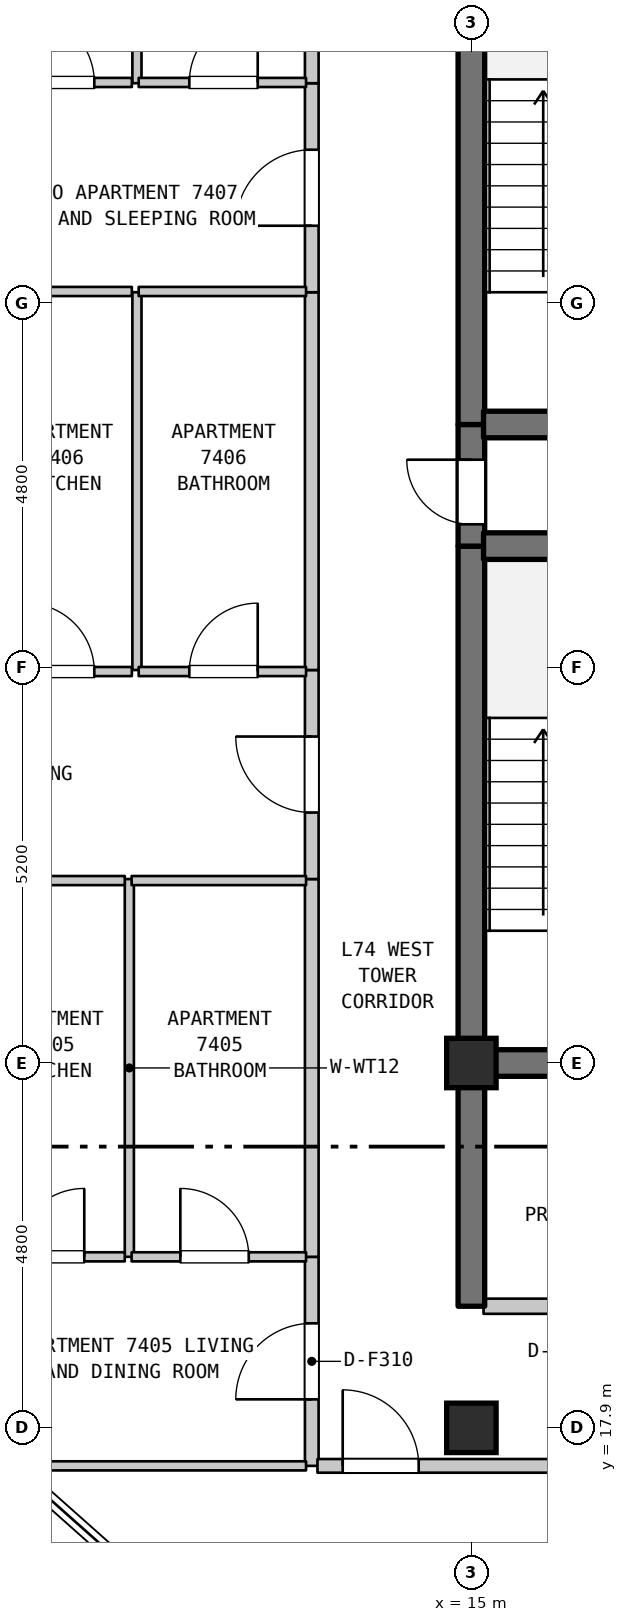
"""IFC4 building model, lengths in metres.
Left out: names, types, materials, properties, quantities, classifications, styles, units other than length and angle.
Written with IfcOpenShell. Run it as: python <this file> out.ifc"""

import sys

from ifc_helpers import new_model, si_unit, direction, frame, frame_2d, origin, origin_2d, place, context, subcontext, project, spatial, rectangle, extrude, element, fill, save


model = new_model("IFC4")
c1 = context("Model", 3, precision=1e-05, world=origin(), true_north=direction((0.0, 1.0)))
c2 = subcontext(c1, "Body", "Model", "MODEL_VIEW")
j1 = project(units=[si_unit("LENGTHUNIT", "METRE"), si_unit("PLANEANGLEUNIT", "RADIAN")], contexts=[c1])
p1 = place(None, origin())
s1 = spatial("IfcSite", under=j1, at=p1, CompositionType="ELEMENT")
p2 = place(p1, origin())
s2 = spatial("IfcBuilding", under=s1, at=p2, CompositionType="ELEMENT")
p3 = place(p2, frame((0.0, 0.0, 295.4)))
s3 = spatial("IfcBuildingStorey", under=s2, at=p3, CompositionType="ELEMENT", Elevation=295.4)
for number, where, z_axis, x_axis in (
    (1, (15.0, 17.9, 0.0), (0.0, 0.0, 1.0), (1.0, 0.0, 0.0)),
    (2, (15.0, 22.7, 0.0), (0.0, 0.0, 1.0), (1.0, 0.0, 0.0)),
):
    element("IfcColumn", number, at=place(p3, frame(where, z_axis=z_axis, x_axis=x_axis)), inside=s3, PredefinedType="COLUMN", context=c2, shape_type="SweptSolid", body=[
        extrude(rectangle(XDim=0.65, YDim=0.65, at=origin_2d()), origin(), (0.0, 0.0, 1.0), 3.7),
    ])
p4 = place(p3, frame((10.5, 20.15, 0.0), z_axis=(0.0, 0.0, 1.0), x_axis=(0.0, 1.0, 0.0)))
e3 = element("IfcWall", 3, at=p4, inside=s3, PredefinedType="PARTITIONING", context=c2, shape_type="SweptSolid", body=[
    extrude(rectangle(XDim=4.97, YDim=0.12, at=frame_2d((2.485, 0.0))), origin(), (0.0, 0.0, 1.0), 3.38),
])
p5 = place(p3, frame((10.6, 27.87, 0.0), z_axis=(0.0, 0.0, 1.0), x_axis=(0.0, 1.0, 0.0)))
e4 = element("IfcWall", 4, at=p5, inside=s3, PredefinedType="PARTITIONING", context=c2, shape_type="SweptSolid", body=[
    extrude(rectangle(XDim=4.97, YDim=0.12, at=frame_2d((2.485, 0.0))), origin(), (0.0, 0.0, 1.0), 3.38),
])
p6 = place(p3, frame((10.6, 35.59, 0.0), z_axis=(0.0, 0.0, 1.0), x_axis=(0.0, 1.0, 0.0)))
e5 = element("IfcWall", 5, at=p6, inside=s3, PredefinedType="PARTITIONING", context=c2, shape_type="SweptSolid", body=[
    extrude(rectangle(XDim=4.51, YDim=0.12, at=frame_2d((2.255, 0.0))), origin(), (0.0, 0.0, 1.0), 3.38),
])
p7 = place(p3, frame((12.9, 17.4, 0.0), z_axis=(0.0, 0.0, 1.0), x_axis=(0.0, 1.0, 0.0)))
e6 = element("IfcWall", 6, at=p7, inside=s3, PredefinedType="STANDARD", context=c2, shape_type="SweptSolid", body=[
    extrude(rectangle(XDim=2.75, YDim=0.18, at=frame_2d((1.375, 0.0))), origin(), (0.0, 0.0, 1.0), 3.38),
])
p8 = place(p7, frame((0.875, 0.0, 0.0)))
e7 = element("IfcOpeningElement", 7, at=p8, cuts=e6, PredefinedType="OPENING", context=c2, shape_type="SweptSolid", body=[
    extrude(rectangle(XDim=1.0, YDim=2.15, at=frame_2d((0.5, 1.075))), frame((0.0, 0.1, 0.0), z_axis=(0.0, -1.0, 0.0), x_axis=(1.0, 0.0, 0.0)), (0.0, 0.0, 1.0), 0.2),
])
p9 = place(p3, frame((12.9, 20.15, 0.0), z_axis=(0.0, 0.0, 1.0), x_axis=(0.0, 1.0, 0.0)))
e8 = element("IfcWall", 8, at=p9, inside=s3, PredefinedType="STANDARD", context=c2, shape_type="SweptSolid", body=[
    extrude(rectangle(XDim=4.97, YDim=0.18, at=frame_2d((2.485, 0.0))), origin(), (0.0, 0.0, 1.0), 3.38),
])
p10 = place(p3, frame((12.9, 25.12, 0.0), z_axis=(0.0, 0.0, 1.0), x_axis=(0.0, 1.0, 0.0)))
e9 = element("IfcWall", 9, at=p10, inside=s3, PredefinedType="STANDARD", context=c2, shape_type="SweptSolid", body=[
    extrude(rectangle(XDim=2.75, YDim=0.18, at=frame_2d((1.375, 0.0))), origin(), (0.0, 0.0, 1.0), 3.38),
])
p11 = place(p10, frame((0.875, 0.0, 0.0)))
e10 = element("IfcOpeningElement", 10, at=p11, cuts=e9, PredefinedType="OPENING", context=c2, shape_type="SweptSolid", body=[
    extrude(rectangle(XDim=1.0, YDim=2.15, at=frame_2d((0.5, 1.075))), frame((0.0, 0.1, 0.0), z_axis=(0.0, -1.0, 0.0), x_axis=(1.0, 0.0, 0.0)), (0.0, 0.0, 1.0), 0.2),
])
p12 = place(p3, frame((12.9, 27.87, 0.0), z_axis=(0.0, 0.0, 1.0), x_axis=(0.0, 1.0, 0.0)))
e11 = element("IfcWall", 11, at=p12, inside=s3, PredefinedType="STANDARD", context=c2, shape_type="SweptSolid", body=[
    extrude(rectangle(XDim=4.97, YDim=0.18, at=frame_2d((2.485, 0.0))), origin(), (0.0, 0.0, 1.0), 3.38),
])
p13 = place(p3, frame((12.9, 32.84, 0.0), z_axis=(0.0, 0.0, 1.0), x_axis=(0.0, 1.0, 0.0)))
e12 = element("IfcWall", 12, at=p13, inside=s3, PredefinedType="STANDARD", context=c2, shape_type="SweptSolid", body=[
    extrude(rectangle(XDim=2.75, YDim=0.18, at=frame_2d((1.375, 0.0))), origin(), (0.0, 0.0, 1.0), 3.38),
])
p14 = place(p13, frame((0.875, 0.0, 0.0)))
e13 = element("IfcOpeningElement", 13, at=p14, cuts=e12, PredefinedType="OPENING", context=c2, shape_type="SweptSolid", body=[
    extrude(rectangle(XDim=1.0, YDim=2.15, at=frame_2d((0.5, 1.075))), frame((0.0, 0.1, 0.0), z_axis=(0.0, -1.0, 0.0), x_axis=(1.0, 0.0, 0.0)), (0.0, 0.0, 1.0), 0.2),
])
p15 = place(p3, frame((12.9, 35.59, 0.0), z_axis=(0.0, 0.0, 1.0), x_axis=(0.0, 1.0, 0.0)))
e14 = element("IfcWall", 14, at=p15, inside=s3, PredefinedType="STANDARD", context=c2, shape_type="SweptSolid", body=[
    extrude(rectangle(XDim=4.51, YDim=0.18, at=frame_2d((2.255, 0.0))), origin(), (0.0, 0.0, 1.0), 3.38),
])
p16 = place(p3, frame((15.0, 19.5, 0.0), z_axis=(0.0, 0.0, 1.0), x_axis=(0.0, 1.0, 0.0)))
e15 = element("IfcWall", 15, at=p16, inside=s3, PredefinedType="SHEAR", context=c2, shape_type="SweptSolid", body=[
    extrude(rectangle(XDim=3.2, YDim=0.35, at=frame_2d((1.6, 0.0))), origin(), (0.0, 0.0, 1.0), 3.38),
])
p17 = place(p3, frame((15.0, 22.7, 0.0), z_axis=(0.0, 0.0, 1.0), x_axis=(0.0, 1.0, 0.0)))
e16 = element("IfcWall", 16, at=p17, inside=s3, PredefinedType="SHEAR", context=c2, shape_type="SweptSolid", body=[
    extrude(rectangle(XDim=6.8, YDim=0.35, at=frame_2d((3.4, 0.0))), origin(), (0.0, 0.0, 1.0), 3.38),
])
p18 = place(p3, frame((15.0, 29.5, 0.0), z_axis=(0.0, 0.0, 1.0), x_axis=(0.0, 1.0, 0.0)))
e17 = element("IfcWall", 17, at=p18, inside=s3, PredefinedType="SHEAR", context=c2, shape_type="SweptSolid", body=[
    extrude(rectangle(XDim=1.6, YDim=0.35, at=frame_2d((0.8, 0.0))), origin(), (0.0, 0.0, 1.0), 3.38),
])
p19 = place(p18, frame((0.287, 0.0, 0.0)))
e18 = element("IfcOpeningElement", 18, at=p19, cuts=e17, PredefinedType="OPENING", context=c2, shape_type="SweptSolid", body=[
    extrude(rectangle(XDim=0.85, YDim=2.1, at=frame_2d((0.425, 1.05))), frame((0.0, 0.185, 0.0), z_axis=(0.0, -1.0, 0.0), x_axis=(1.0, 0.0, 0.0)), (0.0, 0.0, 1.0), 0.37),
])
p20 = place(p3, frame((15.0, 31.1, 0.0), z_axis=(0.0, 0.0, 1.0), x_axis=(0.0, 1.0, 0.0)))
e19 = element("IfcWall", 19, at=p20, inside=s3, PredefinedType="SHEAR", context=c2, shape_type="SweptSolid", body=[
    extrude(rectangle(XDim=6.8, YDim=0.35, at=frame_2d((3.4, 0.0))), origin(), (0.0, 0.0, 1.0), 3.38),
])
p21 = place(p3, frame((8.973, 17.4, 0.0), z_axis=(0.0, 0.0, 1.0), x_axis=(1.0, 0.0, 0.0)))
e20 = element("IfcWall", 20, at=p21, inside=s3, PredefinedType="PARTITIONING", context=c2, shape_type="SweptSolid", body=[
    extrude(rectangle(XDim=3.852, YDim=0.12, at=frame_2d((1.926, 0.0))), origin(), (0.0, 0.0, 1.0), 3.38),
])
p22 = place(p3, frame((12.975, 17.4, 0.0), z_axis=(0.0, 0.0, 1.0), x_axis=(1.0, 0.0, 0.0)))
e21 = element("IfcWall", 21, at=p22, inside=s3, PredefinedType="STANDARD", context=c2, shape_type="SweptSolid", body=[
    extrude(rectangle(XDim=3.18, YDim=0.18, at=frame_2d((1.59, 0.0))), origin(), (0.0, 0.0, 1.0), 3.38),
])
p23 = place(p22, frame((0.332, 0.0, 0.0)))
e22 = element("IfcOpeningElement", 22, at=p23, cuts=e21, PredefinedType="OPENING", context=c2, shape_type="SweptSolid", body=[
    extrude(rectangle(XDim=1.0, YDim=2.15, at=frame_2d((0.5, 1.075))), frame((0.0, 0.1, 0.0), z_axis=(0.0, -1.0, 0.0), x_axis=(1.0, 0.0, 0.0)), (0.0, 0.0, 1.0), 0.2),
])
p24 = place(p3, frame((15.16, 19.5, 0.0), z_axis=(0.0, 0.0, 1.0), x_axis=(1.0, 0.0, 0.0)))
e23 = element("IfcWall", 23, at=p24, inside=s3, PredefinedType="STANDARD", context=c2, shape_type="SweptSolid", body=[
    extrude(rectangle(XDim=3.68, YDim=0.2, at=frame_2d((1.84, 0.0))), origin(), (0.0, 0.0, 1.0), 3.38),
])
p25 = place(p24, frame((1.39, 0.0, 0.0)))
e24 = element("IfcOpeningElement", 24, at=p25, cuts=e23, PredefinedType="OPENING", context=c2, shape_type="SweptSolid", body=[
    extrude(rectangle(XDim=0.9, YDim=2.15, at=frame_2d((0.45, 1.075))), frame((0.0, 0.11, 0.0), z_axis=(0.0, -1.0, 0.0), x_axis=(1.0, 0.0, 0.0)), (0.0, 0.0, 1.0), 0.22),
])
p26 = place(p3, frame((8.473, 20.15, 0.0), z_axis=(0.0, 0.0, 1.0), x_axis=(1.0, 0.0, 0.0)))
e25 = element("IfcWall", 25, at=p26, inside=s3, PredefinedType="PARTITIONING", context=c2, shape_type="SweptSolid", body=[
    extrude(rectangle(XDim=1.967, YDim=0.12, at=frame_2d((0.983, 0.0))), origin(), (0.0, 0.0, 1.0), 3.38),
])
p27 = place(p26, frame((0.534, 0.0, 0.0)))
e26 = element("IfcOpeningElement", 26, at=p27, cuts=e25, PredefinedType="OPENING", context=c2, shape_type="SweptSolid", body=[
    extrude(rectangle(XDim=0.9, YDim=2.15, at=frame_2d((0.45, 1.075))), frame((0.0, 0.07, 0.0), z_axis=(0.0, -1.0, 0.0), x_axis=(1.0, 0.0, 0.0)), (0.0, 0.0, 1.0), 0.14),
])
p28 = place(p3, frame((10.53, 20.15, 0.0), z_axis=(0.0, 0.0, 1.0), x_axis=(1.0, 0.0, 0.0)))
e27 = element("IfcWall", 27, at=p28, inside=s3, PredefinedType="PARTITIONING", context=c2, shape_type="SweptSolid", body=[
    extrude(rectangle(XDim=2.295, YDim=0.12, at=frame_2d((1.147, 0.0))), origin(), (0.0, 0.0, 1.0), 3.38),
])
p29 = place(p28, frame((0.641, 0.0, 0.0)))
e28 = element("IfcOpeningElement", 28, at=p29, cuts=e27, PredefinedType="OPENING", context=c2, shape_type="SweptSolid", body=[
    extrude(rectangle(XDim=0.9, YDim=2.1, at=frame_2d((0.45, 1.05))), frame((0.0, 0.07, 0.0), z_axis=(0.0, -1.0, 0.0), x_axis=(1.0, 0.0, 0.0)), (0.0, 0.0, 1.0), 0.14),
])
p30 = place(p3, frame((15.16, 22.7, 0.0), z_axis=(0.0, 0.0, 1.0), x_axis=(1.0, 0.0, 0.0)))
e29 = element("IfcWall", 29, at=p30, inside=s3, PredefinedType="SHEAR", context=c2, shape_type="SweptSolid", body=[
    extrude(rectangle(XDim=3.68, YDim=0.35, at=frame_2d((1.84, 0.0))), origin(), (0.0, 0.0, 1.0), 3.38),
])
p31 = place(p3, frame((8.473, 25.1, 0.0), z_axis=(0.0, 0.0, 1.0), x_axis=(1.0, 0.0, 0.0)))
e30 = element("IfcWall", 30, at=p31, inside=s3, PredefinedType="PARTITIONING", context=c2, shape_type="SweptSolid", body=[
    extrude(rectangle(XDim=1.967, YDim=0.12, at=frame_2d((0.983, 0.0))), origin(), (0.0, 0.0, 1.0), 3.38),
])
p32 = place(p3, frame((10.53, 25.1, 0.0), z_axis=(0.0, 0.0, 1.0), x_axis=(1.0, 0.0, 0.0)))
e31 = element("IfcWall", 31, at=p32, inside=s3, PredefinedType="PARTITIONING", context=c2, shape_type="SweptSolid", body=[
    extrude(rectangle(XDim=2.295, YDim=0.12, at=frame_2d((1.147, 0.0))), origin(), (0.0, 0.0, 1.0), 3.38),
])
p33 = place(p3, frame((8.645, 27.85, 0.0), z_axis=(0.0, 0.0, 1.0), x_axis=(1.0, 0.0, 0.0)))
e32 = element("IfcWall", 32, at=p33, inside=s3, PredefinedType="PARTITIONING", context=c2, shape_type="SweptSolid", body=[
    extrude(rectangle(XDim=1.888, YDim=0.12, at=frame_2d((0.944, 0.0))), origin(), (0.0, 0.0, 1.0), 3.38),
])
p34 = place(p33, frame((0.494, 0.0, 0.0)))
e33 = element("IfcOpeningElement", 33, at=p34, cuts=e32, PredefinedType="OPENING", context=c2, shape_type="SweptSolid", body=[
    extrude(rectangle(XDim=0.9, YDim=2.15, at=frame_2d((0.45, 1.075))), frame((0.0, 0.07, 0.0), z_axis=(0.0, -1.0, 0.0), x_axis=(1.0, 0.0, 0.0)), (0.0, 0.0, 1.0), 0.14),
])
p35 = place(p3, frame((10.623, 27.85, 0.0), z_axis=(0.0, 0.0, 1.0), x_axis=(1.0, 0.0, 0.0)))
e34 = element("IfcWall", 34, at=p35, inside=s3, PredefinedType="PARTITIONING", context=c2, shape_type="SweptSolid", body=[
    extrude(rectangle(XDim=2.202, YDim=0.12, at=frame_2d((1.101, 0.0))), origin(), (0.0, 0.0, 1.0), 3.38),
])
p36 = place(p35, frame((0.666, 0.0, 0.0)))
e35 = element("IfcOpeningElement", 35, at=p36, cuts=e34, PredefinedType="OPENING", context=c2, shape_type="SweptSolid", body=[
    extrude(rectangle(XDim=0.9, YDim=2.1, at=frame_2d((0.45, 1.05))), frame((0.0, 0.07, 0.0), z_axis=(0.0, -1.0, 0.0), x_axis=(1.0, 0.0, 0.0)), (0.0, 0.0, 1.0), 0.14),
])
for number, where, z_axis, x_axis in (
    (36, (15.16, 29.5, 0.0), (0.0, 0.0, 1.0), (1.0, 0.0, 0.0)),
    (37, (15.16, 31.1, 0.0), (0.0, 0.0, 1.0), (1.0, 0.0, 0.0)),
):
    element("IfcWall", number, at=place(p3, frame(where, z_axis=z_axis, x_axis=x_axis)), inside=s3, PredefinedType="SHEAR", context=c2, shape_type="SweptSolid", body=[
        extrude(rectangle(XDim=3.68, YDim=0.35, at=frame_2d((1.84, 0.0))), origin(), (0.0, 0.0, 1.0), 3.38),
    ])
p37 = place(p3, frame((8.645, 32.85, 0.0), z_axis=(0.0, 0.0, 1.0), x_axis=(1.0, 0.0, 0.0)))
e38 = element("IfcWall", 38, at=p37, inside=s3, PredefinedType="PARTITIONING", context=c2, shape_type="SweptSolid", body=[
    extrude(rectangle(XDim=1.888, YDim=0.12, at=frame_2d((0.944, 0.0))), origin(), (0.0, 0.0, 1.0), 3.38),
])
p38 = place(p3, frame((10.623, 32.85, 0.0), z_axis=(0.0, 0.0, 1.0), x_axis=(1.0, 0.0, 0.0)))
e39 = element("IfcWall", 39, at=p38, inside=s3, PredefinedType="PARTITIONING", context=c2, shape_type="SweptSolid", body=[
    extrude(rectangle(XDim=2.202, YDim=0.12, at=frame_2d((1.101, 0.0))), origin(), (0.0, 0.0, 1.0), 3.38),
])
p39 = place(p3, frame((8.645, 35.6, 0.0), z_axis=(0.0, 0.0, 1.0), x_axis=(1.0, 0.0, 0.0)))
e40 = element("IfcWall", 40, at=p39, inside=s3, PredefinedType="PARTITIONING", context=c2, shape_type="SweptSolid", body=[
    extrude(rectangle(XDim=1.888, YDim=0.12, at=frame_2d((0.944, 0.0))), origin(), (0.0, 0.0, 1.0), 3.38),
])
p40 = place(p39, frame((0.494, 0.0, 0.0)))
e41 = element("IfcOpeningElement", 41, at=p40, cuts=e40, PredefinedType="OPENING", context=c2, shape_type="SweptSolid", body=[
    extrude(rectangle(XDim=0.9, YDim=2.15, at=frame_2d((0.45, 1.075))), frame((0.0, 0.07, 0.0), z_axis=(0.0, -1.0, 0.0), x_axis=(1.0, 0.0, 0.0)), (0.0, 0.0, 1.0), 0.14),
])
p41 = place(p3, frame((10.623, 35.6, 0.0), z_axis=(0.0, 0.0, 1.0), x_axis=(1.0, 0.0, 0.0)))
e42 = element("IfcWall", 42, at=p41, inside=s3, PredefinedType="PARTITIONING", context=c2, shape_type="SweptSolid", body=[
    extrude(rectangle(XDim=2.202, YDim=0.12, at=frame_2d((1.101, 0.0))), origin(), (0.0, 0.0, 1.0), 3.38),
])
p42 = place(p41, frame((0.666, 0.0, 0.0)))
e43 = element("IfcOpeningElement", 43, at=p42, cuts=e42, PredefinedType="OPENING", context=c2, shape_type="SweptSolid", body=[
    extrude(rectangle(XDim=0.9, YDim=2.1, at=frame_2d((0.45, 1.05))), frame((0.0, 0.07, 0.0), z_axis=(0.0, -1.0, 0.0), x_axis=(1.0, 0.0, 0.0)), (0.0, 0.0, 1.0), 0.14),
])
p43 = place(p8, origin())
e44 = element("IfcDoor", 44, at=p43, inside=s3, OperationType="SINGLE_SWING_LEFT", PredefinedType="DOOR", context=c2, shape_type="SweptSolid", body=[
    extrude(rectangle(XDim=1.0, YDim=2.15, at=frame_2d((0.5, 1.075))), frame((0.0, 0.025, 0.0), z_axis=(0.0, -1.0, 0.0), x_axis=(1.0, 0.0, 0.0)), (0.0, 0.0, 1.0), 0.05),
])
fill(e7, e44)
p44 = place(p11, origin())
e45 = element("IfcDoor", 45, at=p44, inside=s3, OperationType="SINGLE_SWING_RIGHT", PredefinedType="DOOR", context=c2, shape_type="SweptSolid", body=[
    extrude(rectangle(XDim=1.0, YDim=2.15, at=frame_2d((0.5, 1.075))), frame((0.0, 0.025, 0.0), z_axis=(0.0, -1.0, 0.0), x_axis=(1.0, 0.0, 0.0)), (0.0, 0.0, 1.0), 0.05),
])
fill(e10, e45)
p45 = place(p14, origin())
e46 = element("IfcDoor", 46, at=p45, inside=s3, OperationType="SINGLE_SWING_LEFT", PredefinedType="DOOR", context=c2, shape_type="SweptSolid", body=[
    extrude(rectangle(XDim=1.0, YDim=2.15, at=frame_2d((0.5, 1.075))), frame((0.0, 0.025, 0.0), z_axis=(0.0, -1.0, 0.0), x_axis=(1.0, 0.0, 0.0)), (0.0, 0.0, 1.0), 0.05),
])
fill(e13, e46)
p46 = place(p19, origin())
e47 = element("IfcDoor", 47, at=p46, inside=s3, OperationType="SINGLE_SWING_RIGHT", PredefinedType="DOOR", context=c2, shape_type="SweptSolid", body=[
    extrude(rectangle(XDim=0.85, YDim=2.1, at=frame_2d((0.425, 1.05))), frame((0.0, 0.025, 0.0), z_axis=(0.0, -1.0, 0.0), x_axis=(1.0, 0.0, 0.0)), (0.0, 0.0, 1.0), 0.05),
])
fill(e18, e47)
p47 = place(p23, origin())
e48 = element("IfcDoor", 48, at=p47, inside=s3, OperationType="SINGLE_SWING_LEFT", PredefinedType="DOOR", context=c2, shape_type="SweptSolid", body=[
    extrude(rectangle(XDim=1.0, YDim=2.15, at=frame_2d((0.5, 1.075))), frame((0.0, 0.025, 0.0), z_axis=(0.0, -1.0, 0.0), x_axis=(1.0, 0.0, 0.0)), (0.0, 0.0, 1.0), 0.05),
])
fill(e22, e48)
p48 = place(p27, origin())
e49 = element("IfcDoor", 49, at=p48, inside=s3, OperationType="SINGLE_SWING_RIGHT", PredefinedType="DOOR", context=c2, shape_type="SweptSolid", body=[
    extrude(rectangle(XDim=0.9, YDim=2.15, at=frame_2d((0.45, 1.075))), frame((0.0, 0.025, 0.0), z_axis=(0.0, -1.0, 0.0), x_axis=(1.0, 0.0, 0.0)), (0.0, 0.0, 1.0), 0.05),
])
fill(e26, e49)
p49 = place(p29, origin())
e50 = element("IfcDoor", 50, at=p49, inside=s3, OperationType="SINGLE_SWING_LEFT", PredefinedType="DOOR", context=c2, shape_type="SweptSolid", body=[
    extrude(rectangle(XDim=0.9, YDim=2.1, at=frame_2d((0.45, 1.05))), frame((0.0, 0.025, 0.0), z_axis=(0.0, -1.0, 0.0), x_axis=(1.0, 0.0, 0.0)), (0.0, 0.0, 1.0), 0.05),
])
fill(e28, e50)
p50 = place(p34, origin())
e51 = element("IfcDoor", 51, at=p50, inside=s3, OperationType="SINGLE_SWING_LEFT", PredefinedType="DOOR", context=c2, shape_type="SweptSolid", body=[
    extrude(rectangle(XDim=0.9, YDim=2.15, at=frame_2d((0.45, 1.075))), frame((0.0, 0.025, 0.0), z_axis=(0.0, -1.0, 0.0), x_axis=(1.0, 0.0, 0.0)), (0.0, 0.0, 1.0), 0.05),
])
fill(e33, e51)
p51 = place(p36, origin())
e52 = element("IfcDoor", 52, at=p51, inside=s3, OperationType="SINGLE_SWING_RIGHT", PredefinedType="DOOR", context=c2, shape_type="SweptSolid", body=[
    extrude(rectangle(XDim=0.9, YDim=2.1, at=frame_2d((0.45, 1.05))), frame((0.0, 0.025, 0.0), z_axis=(0.0, -1.0, 0.0), x_axis=(1.0, 0.0, 0.0)), (0.0, 0.0, 1.0), 0.05),
])
fill(e35, e52)
p52 = place(p40, origin())
e53 = element("IfcDoor", 53, at=p52, inside=s3, OperationType="SINGLE_SWING_LEFT", PredefinedType="DOOR", context=c2, shape_type="SweptSolid", body=[
    extrude(rectangle(XDim=0.9, YDim=2.15, at=frame_2d((0.45, 1.075))), frame((0.0, 0.025, 0.0), z_axis=(0.0, -1.0, 0.0), x_axis=(1.0, 0.0, 0.0)), (0.0, 0.0, 1.0), 0.05),
])
fill(e41, e53)
p53 = place(p42, origin())
e54 = element("IfcDoor", 54, at=p53, inside=s3, OperationType="SINGLE_SWING_RIGHT", PredefinedType="DOOR", context=c2, shape_type="SweptSolid", body=[
    extrude(rectangle(XDim=0.9, YDim=2.1, at=frame_2d((0.45, 1.05))), frame((0.0, 0.025, 0.0), z_axis=(0.0, -1.0, 0.0), x_axis=(1.0, 0.0, 0.0)), (0.0, 0.0, 1.0), 0.05),
])
fill(e43, e54)
save(model, sys.argv[1])
